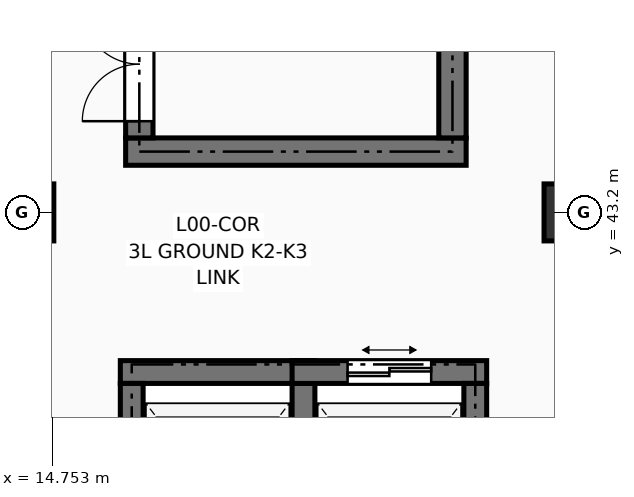
"""IFC4 building model, lengths in metres.
Left out: names, types, materials, properties, quantities, classifications, styles, units other than length and angle.
Written with IfcOpenShell. Run it as: python <this file> out.ifc"""

import sys

from ifc_helpers import new_model, si_unit, direction, frame, frame_2d, origin, origin_2d, place, context, subcontext, project, spatial, rectangle, extrude, element, fill, save


model = new_model("IFC4")
c1 = context("Model", 3, precision=1e-05, world=origin(), true_north=direction((0.0, 1.0)))
c2 = subcontext(c1, "Body", "Model", "MODEL_VIEW")
j1 = project(units=[si_unit("LENGTHUNIT", "METRE"), si_unit("PLANEANGLEUNIT", "RADIAN")], contexts=[c1])
p1 = place(None, origin())
s1 = spatial("IfcSite", under=j1, at=p1, CompositionType="ELEMENT")
p2 = place(p1, origin())
s2 = spatial("IfcBuilding", under=s1, at=p2, CompositionType="ELEMENT")
p3 = place(p2, origin())
s3 = spatial("IfcBuildingStorey", under=s2, at=p3, CompositionType="ELEMENT", Elevation=0.0)
for number, where, z_axis, x_axis in (
    (1, (14.4, 43.2, 0.0), (0.0, 0.0, 1.0), (1.0, 0.0, 0.0)),
    (2, (21.6, 43.2, 0.0), (0.0, 0.0, 1.0), (1.0, 0.0, 0.0)),
):
    element("IfcColumn", number, at=place(p3, frame(where, z_axis=z_axis, x_axis=x_axis)), inside=s3, PredefinedType="COLUMN", context=c2, shape_type="SweptSolid", body=[
        extrude(rectangle(XDim=0.75, YDim=0.75, at=origin_2d()), origin(), (0.0, 0.0, 1.0), 4.5),
    ])
p4 = place(p3, frame((15.72, 44.0, 0.0), z_axis=(0.0, 0.0, 1.0), x_axis=(1.0, 0.0, 0.0)))
e3 = element("IfcWall", 3, at=p4, inside=s3, PredefinedType="SHEAR", context=c2, shape_type="SweptSolid", body=[
    extrude(rectangle(XDim=4.48, YDim=0.36, at=frame_2d((2.24, 0.0))), origin(), (0.0, 0.0, 1.0), 4.25),
])
p5 = place(p3, frame((15.9, 44.18, 0.0), z_axis=(0.0, 0.0, 1.0), x_axis=(0.0, 1.0, 0.0)))
e4 = element("IfcWall", 4, at=p5, inside=s3, PredefinedType="SHEAR", context=c2, shape_type="SweptSolid", body=[
    extrude(rectangle(XDim=7.24, YDim=0.36, at=frame_2d((3.62, 0.0))), origin(), (0.0, 0.0, 1.0), 4.25),
])
p6 = place(p5, frame((0.22, 0.0, 0.0)))
e5 = element("IfcOpeningElement", 5, at=p6, cuts=e4, PredefinedType="OPENING", context=c2, shape_type="SweptSolid", body=[
    extrude(rectangle(XDim=1.5, YDim=2.2, at=frame_2d((0.75, 1.1))), frame((0.0, 0.192, 0.0), z_axis=(0.0, -1.0, 0.0), x_axis=(1.0, 0.0, 0.0)), (0.0, 0.0, 1.0), 0.384),
])
p7 = place(p3, frame((20.02, 44.18, 0.0), z_axis=(0.0, 0.0, 1.0), x_axis=(0.0, 1.0, 0.0)))
e6 = element("IfcWall", 6, at=p7, inside=s3, PredefinedType="SHEAR", context=c2, shape_type="SweptSolid", body=[
    extrude(rectangle(XDim=7.24, YDim=0.36, at=frame_2d((3.62, 0.0))), origin(), (0.0, 0.0, 1.0), 4.25),
])
p8 = place(p3, frame((15.65, 41.1, 0.0), z_axis=(0.0, 0.0, 1.0), x_axis=(1.0, 0.0, 0.0)))
e7 = element("IfcWall", 7, at=p8, inside=s3, PredefinedType="SHEAR", context=c2, shape_type="SweptSolid", body=[
    extrude(rectangle(XDim=2.56, YDim=0.3, at=frame_2d((1.28, 0.0))), origin(), (0.0, 0.0, 1.0), 4.25),
])
p9 = place(p3, frame((15.8, 37.98, 0.0), z_axis=(0.0, 0.0, 1.0), x_axis=(0.0, 1.0, 0.0)))
e8 = element("IfcWall", 8, at=p9, inside=s3, PredefinedType="SHEAR", context=c2, shape_type="SweptSolid", body=[
    extrude(rectangle(XDim=2.97, YDim=0.3, at=frame_2d((1.485, 0.0))), origin(), (0.0, 0.0, 1.0), 4.25),
])
p10 = place(p9, frame((0.935, 0.0, 0.0)))
e9 = element("IfcOpeningElement", 9, at=p10, cuts=e8, PredefinedType="OPENING", context=c2, shape_type="SweptSolid", body=[
    extrude(rectangle(XDim=1.1, YDim=2.2, at=frame_2d((0.55, 1.1))), frame((0.0, 0.162, 0.0), z_axis=(0.0, -1.0, 0.0), x_axis=(1.0, 0.0, 0.0)), (0.0, 0.0, 1.0), 0.324),
])
p11 = place(p3, frame((18.06, 37.98, 0.0), z_axis=(0.0, 0.0, 1.0), x_axis=(0.0, 1.0, 0.0)))
e10 = element("IfcWall", 10, at=p11, inside=s3, PredefinedType="SHEAR", context=c2, shape_type="SweptSolid", body=[
    extrude(rectangle(XDim=2.97, YDim=0.3, at=frame_2d((1.485, 0.0))), origin(), (0.0, 0.0, 1.0), 4.25),
])
p12 = place(p3, frame((17.91, 41.1, 0.0), z_axis=(0.0, 0.0, 1.0), x_axis=(1.0, 0.0, 0.0)))
e11 = element("IfcWall", 11, at=p12, inside=s3, PredefinedType="SHEAR", context=c2, shape_type="SweptSolid", body=[
    extrude(rectangle(XDim=2.56, YDim=0.3, at=frame_2d((1.28, 0.0))), origin(), (0.0, 0.0, 1.0), 4.25),
])
p13 = place(p12, frame((0.73, 0.0, 0.0)))
e12 = element("IfcOpeningElement", 12, at=p13, cuts=e11, PredefinedType="OPENING", context=c2, shape_type="SweptSolid", body=[
    extrude(rectangle(XDim=1.1, YDim=2.2, at=frame_2d((0.55, 1.1))), frame((0.0, 0.162, 0.0), z_axis=(0.0, -1.0, 0.0), x_axis=(1.0, 0.0, 0.0)), (0.0, 0.0, 1.0), 0.324),
])
p14 = place(p3, frame((20.32, 37.98, 0.0), z_axis=(0.0, 0.0, 1.0), x_axis=(0.0, 1.0, 0.0)))
e13 = element("IfcWall", 13, at=p14, inside=s3, PredefinedType="SHEAR", context=c2, shape_type="SweptSolid", body=[
    extrude(rectangle(XDim=2.97, YDim=0.3, at=frame_2d((1.485, 0.0))), origin(), (0.0, 0.0, 1.0), 4.25),
])
p15 = place(p6, origin())
e14 = element("IfcDoor", 14, at=p15, inside=s3, OperationType="DOUBLE_DOOR_SINGLE_SWING", PredefinedType="DOOR", context=c2, shape_type="SweptSolid", body=[
    extrude(rectangle(XDim=1.5, YDim=2.2, at=frame_2d((0.75, 1.1))), frame((0.0, 0.025, 0.0), z_axis=(0.0, -1.0, 0.0), x_axis=(1.0, 0.0, 0.0)), (0.0, 0.0, 1.0), 0.05),
])
fill(e5, e14)
p16 = place(p13, origin())
e15 = element("IfcDoor", 15, at=p16, inside=s3, OperationType="DOUBLE_DOOR_SLIDING", PredefinedType="DOOR", context=c2, shape_type="SweptSolid", body=[
    extrude(rectangle(XDim=1.1, YDim=2.2, at=frame_2d((0.55, 1.1))), frame((0.0, 0.025, 0.0), z_axis=(0.0, -1.0, 0.0), x_axis=(1.0, 0.0, 0.0)), (0.0, 0.0, 1.0), 0.05),
])
fill(e12, e15)
save(model, sys.argv[1])
